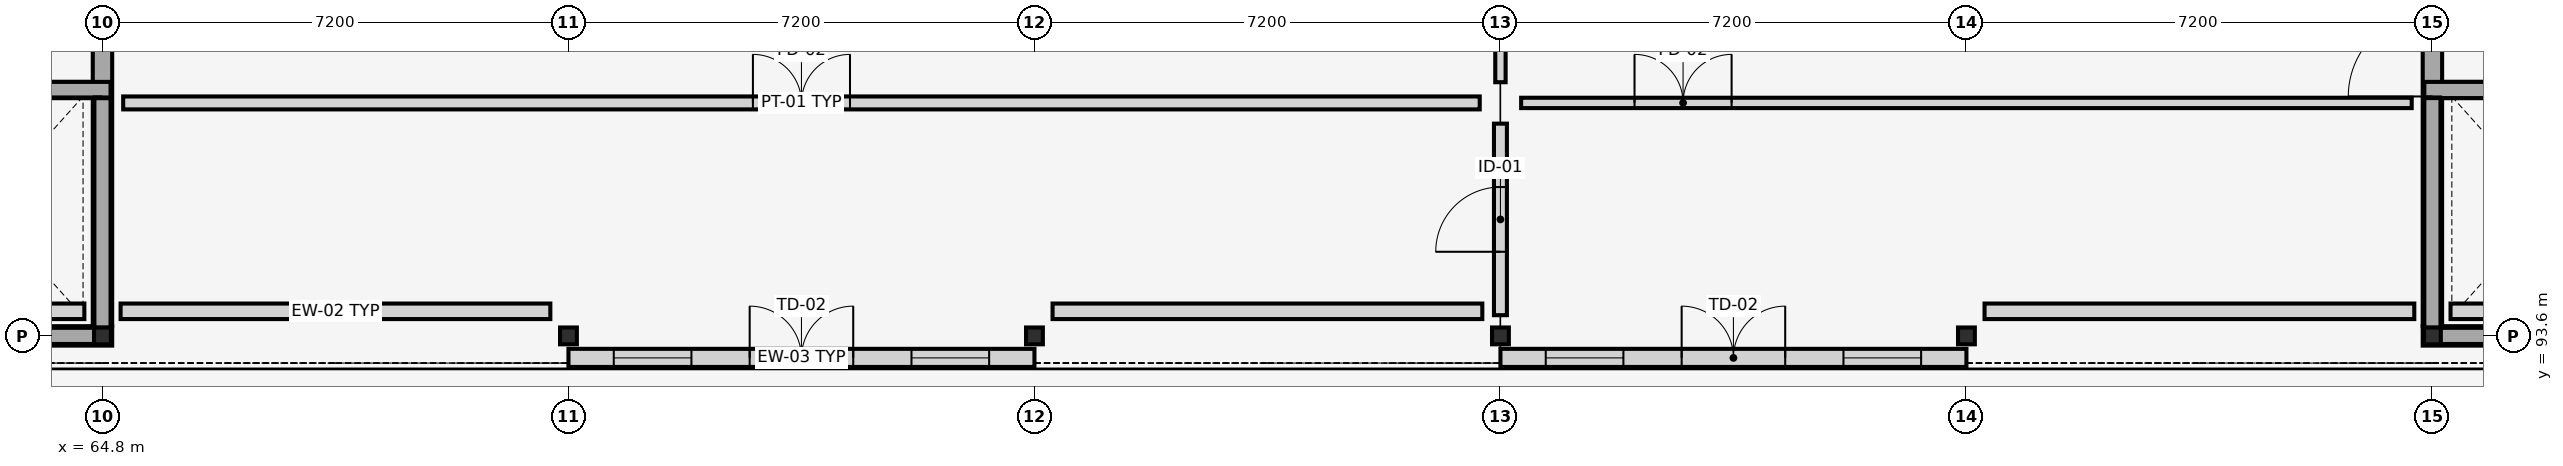
"""IFC4 building model, lengths in metres.
Left out: names, types, materials, properties, quantities, classifications, styles, units other than length and angle.
Written with IfcOpenShell. Run it as: python <this file> out.ifc"""

import sys

from ifc_helpers import new_model, si_unit, direction, frame, frame_2d, origin, origin_2d, place, context, subcontext, project, spatial, polyline, rectangle, i_section, outline, extrude, element, fill, save


model = new_model("IFC4")
c1 = context("Model", 3, precision=1e-05, world=origin(), true_north=direction((0.0, 1.0)))
c2 = subcontext(c1, "Body", "Model", "MODEL_VIEW")
j1 = project(units=[si_unit("LENGTHUNIT", "METRE"), si_unit("PLANEANGLEUNIT", "RADIAN")], contexts=[c1])
p1 = place(None, origin())
s1 = spatial("IfcSite", under=j1, at=p1, CompositionType="ELEMENT")
p2 = place(p1, origin())
s2 = spatial("IfcBuilding", under=s1, at=p2, CompositionType="ELEMENT")
p3 = place(p2, frame((0.0, 0.0, 25.2)))
s3 = spatial("IfcBuildingStorey", under=s2, at=p3, CompositionType="ELEMENT", Elevation=25.2)
for number, where, z_axis, x_axis in (
    (1, (64.8, 93.6, 0.0), (0.0, 0.0, 1.0), (0.0, 1.0, 0.0)),
    (2, (72.0, 93.6, 0.0), (0.0, 0.0, 1.0), (1.0, 0.0, 0.0)),
    (3, (79.2, 93.6, 0.0), (0.0, 0.0, 1.0), (0.0, 1.0, 0.0)),
    (4, (86.4, 93.6, 0.0), (0.0, 0.0, 1.0), (1.0, 0.0, 0.0)),
    (5, (93.6, 93.6, 0.0), (0.0, 0.0, 1.0), (0.0, 1.0, 0.0)),
    (6, (100.8, 93.6, 0.0), (0.0, 0.0, 1.0), (1.0, 0.0, 0.0)),
):
    element("IfcColumn", number, at=place(p3, frame(where, z_axis=z_axis, x_axis=x_axis)), inside=s3, PredefinedType="COLUMN", context=c2, shape_type="SweptSolid", body=[
        extrude(i_section(OverallWidth=0.26, OverallDepth=0.26, WebThickness=0.01, FlangeThickness=0.018, FilletRadius=0.024, at=origin_2d()), origin(), (0.0, 0.0, 1.0), 5.4),
    ])
p4 = place(p3, frame((57.88, 93.98, 0.0), z_axis=(0.0, 0.0, 1.0), x_axis=(1.0, 0.0, 0.0)))
e7 = element("IfcWall", 7, at=p4, inside=s3, PredefinedType="STANDARD", context=c2, shape_type="SweptSolid", body=[
    extrude(rectangle(XDim=6.64, YDim=0.24, at=frame_2d((3.32, 0.0))), origin(), (0.0, 0.0, 1.0), 4.78),
])
p5 = place(p3, frame((65.08, 93.98, 0.0), z_axis=(0.0, 0.0, 1.0), x_axis=(1.0, 0.0, 0.0)))
e8 = element("IfcWall", 8, at=p5, inside=s3, PredefinedType="STANDARD", context=c2, shape_type="SweptSolid", body=[
    extrude(rectangle(XDim=6.64, YDim=0.24, at=frame_2d((3.32, 0.0))), origin(), (0.0, 0.0, 1.0), 4.78),
])
p6 = place(p3, frame((72.0, 93.26, 0.0), z_axis=(0.0, 0.0, 1.0), x_axis=(1.0, 0.0, 0.0)))
e9 = element("IfcWall", 9, at=p6, inside=s3, PredefinedType="STANDARD", context=c2, shape_type="SweptSolid", body=[
    extrude(rectangle(XDim=7.2, YDim=0.28, at=frame_2d((3.6, 0.0))), origin(), (0.0, 0.0, 1.0), 5.4),
])
p7 = place(p6, frame((2.8, 0.0, 0.0)))
e10 = element("IfcOpeningElement", 10, at=p7, cuts=e9, PredefinedType="OPENING", context=c2, shape_type="SweptSolid", body=[
    extrude(rectangle(XDim=1.6, YDim=2.3, at=frame_2d((0.8, 1.15))), frame((0.0, 0.15, 0.0), z_axis=(0.0, -1.0, 0.0), x_axis=(1.0, 0.0, 0.0)), (0.0, 0.0, 1.0), 0.3),
])
p8 = place(p6, frame((0.7, 0.0, 0.85)))
e11 = element("IfcOpeningElement", 11, at=p8, cuts=e9, PredefinedType="OPENING", context=c2, shape_type="SweptSolid", body=[
    extrude(rectangle(XDim=1.2, YDim=2.2, at=frame_2d((0.6, 1.1))), frame((0.0, 0.15, 0.0), z_axis=(0.0, -1.0, 0.0), x_axis=(1.0, 0.0, 0.0)), (0.0, 0.0, 1.0), 0.3),
])
p9 = place(p6, frame((5.3, 0.0, 0.85)))
e12 = element("IfcOpeningElement", 12, at=p9, cuts=e9, PredefinedType="OPENING", context=c2, shape_type="SweptSolid", body=[
    extrude(rectangle(XDim=1.2, YDim=2.2, at=frame_2d((0.6, 1.1))), frame((0.0, 0.15, 0.0), z_axis=(0.0, -1.0, 0.0), x_axis=(1.0, 0.0, 0.0)), (0.0, 0.0, 1.0), 0.3),
])
p10 = place(p3, frame((79.48, 93.98, 0.0), z_axis=(0.0, 0.0, 1.0), x_axis=(1.0, 0.0, 0.0)))
e13 = element("IfcWall", 13, at=p10, inside=s3, PredefinedType="STANDARD", context=c2, shape_type="SweptSolid", body=[
    extrude(rectangle(XDim=6.64, YDim=0.24, at=frame_2d((3.32, 0.0))), origin(), (0.0, 0.0, 1.0), 4.78),
])
p11 = place(p3, frame((86.4, 93.26, 0.0), z_axis=(0.0, 0.0, 1.0), x_axis=(1.0, 0.0, 0.0)))
e14 = element("IfcWall", 14, at=p11, inside=s3, PredefinedType="STANDARD", context=c2, shape_type="SweptSolid", body=[
    extrude(rectangle(XDim=7.2, YDim=0.28, at=frame_2d((3.6, 0.0))), origin(), (0.0, 0.0, 1.0), 5.4),
])
p12 = place(p11, frame((2.8, 0.0, 0.0)))
e15 = element("IfcOpeningElement", 15, at=p12, cuts=e14, PredefinedType="OPENING", context=c2, shape_type="SweptSolid", body=[
    extrude(rectangle(XDim=1.6, YDim=2.3, at=frame_2d((0.8, 1.15))), frame((0.0, 0.15, 0.0), z_axis=(0.0, -1.0, 0.0), x_axis=(1.0, 0.0, 0.0)), (0.0, 0.0, 1.0), 0.3),
])
p13 = place(p11, frame((0.7, 0.0, 0.85)))
e16 = element("IfcOpeningElement", 16, at=p13, cuts=e14, PredefinedType="OPENING", context=c2, shape_type="SweptSolid", body=[
    extrude(rectangle(XDim=1.2, YDim=2.2, at=frame_2d((0.6, 1.1))), frame((0.0, 0.15, 0.0), z_axis=(0.0, -1.0, 0.0), x_axis=(1.0, 0.0, 0.0)), (0.0, 0.0, 1.0), 0.3),
])
p14 = place(p11, frame((5.3, 0.0, 0.85)))
e17 = element("IfcOpeningElement", 17, at=p14, cuts=e14, PredefinedType="OPENING", context=c2, shape_type="SweptSolid", body=[
    extrude(rectangle(XDim=1.2, YDim=2.2, at=frame_2d((0.6, 1.1))), frame((0.0, 0.15, 0.0), z_axis=(0.0, -1.0, 0.0), x_axis=(1.0, 0.0, 0.0)), (0.0, 0.0, 1.0), 0.3),
])
p15 = place(p3, frame((93.88, 93.98, 0.0), z_axis=(0.0, 0.0, 1.0), x_axis=(1.0, 0.0, 0.0)))
e18 = element("IfcWall", 18, at=p15, inside=s3, PredefinedType="STANDARD", context=c2, shape_type="SweptSolid", body=[
    extrude(rectangle(XDim=6.64, YDim=0.24, at=frame_2d((3.32, 0.0))), origin(), (0.0, 0.0, 1.0), 4.78),
])
p16 = place(p3, frame((101.08, 93.98, 0.0), z_axis=(0.0, 0.0, 1.0), x_axis=(1.0, 0.0, 0.0)))
e19 = element("IfcWall", 19, at=p16, inside=s3, PredefinedType="STANDARD", context=c2, shape_type="SweptSolid", body=[
    extrude(rectangle(XDim=6.64, YDim=0.24, at=frame_2d((3.32, 0.0))), origin(), (0.0, 0.0, 1.0), 4.78),
])
p17 = place(p3, frame((64.8, 97.55, 5.42), z_axis=(0.0, 0.0, 1.0), x_axis=(0.0, 1.0, 0.0)))
e20 = element("IfcWall", 20, at=p17, inside=s3, PredefinedType="STANDARD", context=c2, shape_type="SweptSolid", body=[
    extrude(outline(polyline([(0.0, 0.0), (3.25, 0.0), (3.25, 6.46), (0.0, 0.13), (0.0, 0.0)])), frame((0.0, 0.12, 0.0), z_axis=(0.0, -1.0, 0.0), x_axis=(1.0, 0.0, 0.0)), (0.0, 0.0, 1.0), 0.24),
])
p18 = place(p3, frame((57.6, 93.6, 0.0), z_axis=(0.0, 0.0, 1.0), x_axis=(1.0, 0.0, 0.0)))
e21 = element("IfcWall", 21, at=p18, inside=s3, PredefinedType="SHEAR", context=c2, shape_type="SweptSolid", body=[
    extrude(rectangle(XDim=7.35, YDim=0.3, at=frame_2d((3.675, 0.0))), origin(), (0.0, 0.0, 1.0), 5.18),
])
p19 = place(p3, frame((64.8, 93.75, 0.0), z_axis=(0.0, 0.0, 1.0), x_axis=(0.0, 1.0, 0.0)))
e22 = element("IfcWall", 22, at=p19, inside=s3, PredefinedType="SHEAR", context=c2, shape_type="SweptSolid", body=[
    extrude(rectangle(XDim=14.1, YDim=0.3, at=frame_2d((7.05, 0.0))), origin(), (0.0, 0.0, 1.0), 5.18),
])
p20 = place(p19, frame((3.55, 0.0, 0.0)))
e23 = element("IfcOpeningElement", 23, at=p20, cuts=e22, PredefinedType="OPENING", context=c2, shape_type="SweptSolid", body=[
    extrude(rectangle(XDim=1.3, YDim=2.2, at=frame_2d((0.65, 1.1))), frame((0.0, 0.16, 0.0), z_axis=(0.0, -1.0, 0.0), x_axis=(1.0, 0.0, 0.0)), (0.0, 0.0, 1.0), 0.32),
])
p21 = place(p19, frame((7.85, 0.0, 0.0)))
e24 = element("IfcOpeningElement", 24, at=p21, cuts=e22, PredefinedType="OPENING", context=c2, shape_type="SweptSolid", body=[
    extrude(rectangle(XDim=1.05, YDim=2.15, at=frame_2d((0.525, 1.075))), frame((0.0, 0.16, 0.0), z_axis=(0.0, -1.0, 0.0), x_axis=(1.0, 0.0, 0.0)), (0.0, 0.0, 1.0), 0.32),
])
p22 = place(p19, frame((10.55, 0.0, 0.0)))
e25 = element("IfcOpeningElement", 25, at=p22, cuts=e22, PredefinedType="OPENING", context=c2, shape_type="SweptSolid", body=[
    extrude(rectangle(XDim=1.0, YDim=2.15, at=frame_2d((0.5, 1.075))), frame((0.0, 0.16, 0.0), z_axis=(0.0, -1.0, 0.0), x_axis=(1.0, 0.0, 0.0)), (0.0, 0.0, 1.0), 0.32),
])
p23 = place(p3, frame((61.275, 97.4, 0.0), z_axis=(0.0, 0.0, 1.0), x_axis=(1.0, 0.0, 0.0)))
e26 = element("IfcWall", 26, at=p23, inside=s3, PredefinedType="SHEAR", context=c2, shape_type="SweptSolid", body=[
    extrude(rectangle(XDim=3.375, YDim=0.25, at=frame_2d((1.688, 0.0))), origin(), (0.0, 0.0, 1.0), 5.18),
])
p24 = place(p3, frame((61.275, 93.6, 5.18), z_axis=(0.0, 0.0, 1.0), x_axis=(1.0, 0.0, 0.0)))
e27 = element("IfcWall", 27, at=p24, inside=s3, PredefinedType="SHEAR", context=c2, shape_type="SweptSolid", body=[
    extrude(rectangle(XDim=3.65, YDim=0.25, at=frame_2d((1.825, 0.0))), origin(), (0.0, 0.0, 1.0), 1.72),
])
p25 = place(p3, frame((64.8, 93.725, 5.18), z_axis=(0.0, 0.0, 1.0), x_axis=(0.0, 1.0, 0.0)))
e28 = element("IfcWall", 28, at=p25, inside=s3, PredefinedType="SHEAR", context=c2, shape_type="SweptSolid", body=[
    extrude(rectangle(XDim=3.55, YDim=0.25, at=frame_2d((1.775, 0.0))), origin(), (0.0, 0.0, 1.0), 1.72),
])
p26 = place(p3, frame((64.925, 97.4, 5.18), z_axis=(0.0, 0.0, 1.0), x_axis=(-1.0, 0.0, 0.0)))
e29 = element("IfcWall", 29, at=p26, inside=s3, PredefinedType="SHEAR", context=c2, shape_type="SweptSolid", body=[
    extrude(rectangle(XDim=3.65, YDim=0.25, at=frame_2d((1.825, 0.0))), origin(), (0.0, 0.0, 1.0), 1.72),
])
p27 = place(p3, frame((100.65, 93.6, 0.0), z_axis=(0.0, 0.0, 1.0), x_axis=(1.0, 0.0, 0.0)))
e30 = element("IfcWall", 30, at=p27, inside=s3, PredefinedType="SHEAR", context=c2, shape_type="SweptSolid", body=[
    extrude(rectangle(XDim=7.35, YDim=0.3, at=frame_2d((3.675, 0.0))), origin(), (0.0, 0.0, 1.0), 5.18),
])
p28 = place(p3, frame((100.8, 93.75, 0.0), z_axis=(0.0, 0.0, 1.0), x_axis=(0.0, 1.0, 0.0)))
e31 = element("IfcWall", 31, at=p28, inside=s3, PredefinedType="SHEAR", context=c2, shape_type="SweptSolid", body=[
    extrude(rectangle(XDim=14.1, YDim=0.3, at=frame_2d((7.05, 0.0))), origin(), (0.0, 0.0, 1.0), 5.18),
])
p29 = place(p28, frame((3.55, 0.0, 0.0)))
e32 = element("IfcOpeningElement", 32, at=p29, cuts=e31, PredefinedType="OPENING", context=c2, shape_type="SweptSolid", body=[
    extrude(rectangle(XDim=1.3, YDim=2.2, at=frame_2d((0.65, 1.1))), frame((0.0, 0.16, 0.0), z_axis=(0.0, -1.0, 0.0), x_axis=(1.0, 0.0, 0.0)), (0.0, 0.0, 1.0), 0.32),
])
p30 = place(p28, frame((7.85, 0.0, 0.0)))
e33 = element("IfcOpeningElement", 33, at=p30, cuts=e31, PredefinedType="OPENING", context=c2, shape_type="SweptSolid", body=[
    extrude(rectangle(XDim=1.05, YDim=2.15, at=frame_2d((0.525, 1.075))), frame((0.0, 0.16, 0.0), z_axis=(0.0, -1.0, 0.0), x_axis=(1.0, 0.0, 0.0)), (0.0, 0.0, 1.0), 0.32),
])
p31 = place(p28, frame((10.55, 0.0, 0.0)))
e34 = element("IfcOpeningElement", 34, at=p31, cuts=e31, PredefinedType="OPENING", context=c2, shape_type="SweptSolid", body=[
    extrude(rectangle(XDim=1.0, YDim=2.15, at=frame_2d((0.5, 1.075))), frame((0.0, 0.16, 0.0), z_axis=(0.0, -1.0, 0.0), x_axis=(1.0, 0.0, 0.0)), (0.0, 0.0, 1.0), 0.32),
])
p32 = place(p3, frame((100.95, 97.4, 0.0), z_axis=(0.0, 0.0, 1.0), x_axis=(1.0, 0.0, 0.0)))
e35 = element("IfcWall", 35, at=p32, inside=s3, PredefinedType="SHEAR", context=c2, shape_type="SweptSolid", body=[
    extrude(rectangle(XDim=3.375, YDim=0.25, at=frame_2d((1.688, 0.0))), origin(), (0.0, 0.0, 1.0), 5.18),
])
for number, where, z_axis, x_axis in (
    (36, (100.675, 93.6, 5.18), (0.0, 0.0, 1.0), (1.0, 0.0, 0.0)),
    (37, (104.325, 97.4, 5.18), (0.0, 0.0, 1.0), (-1.0, 0.0, 0.0)),
):
    element("IfcWall", number, at=place(p3, frame(where, z_axis=z_axis, x_axis=x_axis)), inside=s3, PredefinedType="SHEAR", context=c2, shape_type="SweptSolid", body=[
        extrude(rectangle(XDim=3.65, YDim=0.25, at=frame_2d((1.825, 0.0))), origin(), (0.0, 0.0, 1.0), 1.72),
    ])
p33 = place(p3, frame((100.8, 97.275, 5.18), z_axis=(0.0, 0.0, 1.0), x_axis=(0.0, -1.0, 0.0)))
e38 = element("IfcWall", 38, at=p33, inside=s3, PredefinedType="SHEAR", context=c2, shape_type="SweptSolid", body=[
    extrude(rectangle(XDim=3.55, YDim=0.25, at=frame_2d((1.775, 0.0))), origin(), (0.0, 0.0, 1.0), 1.72),
])
p34 = place(p3, frame((65.12, 97.2, 0.0), z_axis=(0.0, 0.0, 1.0), x_axis=(1.0, 0.0, 0.0)))
e39 = element("IfcWall", 39, at=p34, inside=s3, PredefinedType="PARTITIONING", context=c2, shape_type="SweptSolid", body=[
    extrude(rectangle(XDim=20.96, YDim=0.2, at=frame_2d((10.48, 0.0))), origin(), (0.0, 0.0, 1.0), 4.35),
])
p35 = place(p34, frame((9.73, 0.0, 0.0)))
e40 = element("IfcOpeningElement", 40, at=p35, cuts=e39, PredefinedType="OPENING", context=c2, shape_type="SweptSolid", body=[
    extrude(rectangle(XDim=1.5, YDim=2.25, at=frame_2d((0.75, 1.125))), frame((0.0, 0.11, 0.0), z_axis=(0.0, -1.0, 0.0), x_axis=(1.0, 0.0, 0.0)), (0.0, 0.0, 1.0), 0.22),
])
p36 = place(p3, frame((86.4, 93.92, 0.0), z_axis=(0.0, 0.0, 1.0), x_axis=(0.0, 1.0, 0.0)))
e41 = element("IfcWall", 41, at=p36, inside=s3, PredefinedType="PARTITIONING", context=c2, shape_type="SweptSolid", body=[
    extrude(rectangle(XDim=2.96, YDim=0.2, at=frame_2d((1.48, 0.0))), origin(), (0.0, 0.0, 1.0), 4.35),
])
p37 = place(p36, frame((0.98, 0.0, 0.0)))
e42 = element("IfcOpeningElement", 42, at=p37, cuts=e41, PredefinedType="OPENING", context=c2, shape_type="SweptSolid", body=[
    extrude(rectangle(XDim=1.0, YDim=2.15, at=frame_2d((0.5, 1.075))), frame((0.0, 0.11, 0.0), z_axis=(0.0, -1.0, 0.0), x_axis=(1.0, 0.0, 0.0)), (0.0, 0.0, 1.0), 0.22),
])
p38 = place(p3, frame((86.4, 97.52, 0.0), z_axis=(0.0, 0.0, 1.0), x_axis=(0.0, 1.0, 0.0)))
e43 = element("IfcWall", 43, at=p38, inside=s3, PredefinedType="PARTITIONING", context=c2, shape_type="SweptSolid", body=[
    extrude(rectangle(XDim=17.36, YDim=0.16, at=frame_2d((8.68, 0.0))), origin(), (0.0, 0.0, 1.0), 4.35),
])
p39 = place(p38, frame((7.705, 0.0, 0.0)))
e44 = element("IfcOpeningElement", 44, at=p39, cuts=e43, PredefinedType="OPENING", context=c2, shape_type="SweptSolid", body=[
    extrude(rectangle(XDim=1.95, YDim=2.6, at=frame_2d((0.975, 1.3))), frame((0.0, 0.09, 0.0), z_axis=(0.0, -1.0, 0.0), x_axis=(1.0, 0.0, 0.0)), (0.0, 0.0, 1.0), 0.18),
])
p40 = place(p3, frame((86.72, 97.2, 0.0), z_axis=(0.0, 0.0, 1.0), x_axis=(1.0, 0.0, 0.0)))
e45 = element("IfcWall", 45, at=p40, inside=s3, PredefinedType="PARTITIONING", context=c2, shape_type="SweptSolid", body=[
    extrude(rectangle(XDim=13.76, YDim=0.16, at=frame_2d((6.88, 0.0))), origin(), (0.0, 0.0, 1.0), 4.35),
])
p41 = place(p40, frame((1.752, 0.0, 0.0)))
e46 = element("IfcOpeningElement", 46, at=p41, cuts=e45, PredefinedType="OPENING", context=c2, shape_type="SweptSolid", body=[
    extrude(rectangle(XDim=1.5, YDim=2.25, at=frame_2d((0.75, 1.125))), frame((0.0, 0.09, 0.0), z_axis=(0.0, -1.0, 0.0), x_axis=(1.0, 0.0, 0.0)), (0.0, 0.0, 1.0), 0.18),
])
p42 = place(p7, origin())
e47 = element("IfcDoor", 47, at=p42, inside=s3, OperationType="DOUBLE_DOOR_SINGLE_SWING", PredefinedType="DOOR", context=c2, shape_type="SweptSolid", body=[
    extrude(rectangle(XDim=1.6, YDim=2.3, at=frame_2d((0.8, 1.15))), frame((0.0, 0.025, 0.0), z_axis=(0.0, -1.0, 0.0), x_axis=(1.0, 0.0, 0.0)), (0.0, 0.0, 1.0), 0.05),
])
fill(e10, e47)
p43 = place(p8, origin())
e48 = element("IfcWindow", 48, at=p43, inside=s3, PartitioningType="SINGLE_PANEL", PredefinedType="WINDOW", context=c2, shape_type="SweptSolid", body=[
    extrude(rectangle(XDim=1.2, YDim=2.2, at=frame_2d((0.6, 1.1))), frame((0.0, 0.03, 0.0), z_axis=(0.0, -1.0, 0.0), x_axis=(1.0, 0.0, 0.0)), (0.0, 0.0, 1.0), 0.06),
])
fill(e11, e48)
p44 = place(p9, origin())
e49 = element("IfcWindow", 49, at=p44, inside=s3, PartitioningType="SINGLE_PANEL", PredefinedType="WINDOW", context=c2, shape_type="SweptSolid", body=[
    extrude(rectangle(XDim=1.2, YDim=2.2, at=frame_2d((0.6, 1.1))), frame((0.0, 0.03, 0.0), z_axis=(0.0, -1.0, 0.0), x_axis=(1.0, 0.0, 0.0)), (0.0, 0.0, 1.0), 0.06),
])
fill(e12, e49)
p45 = place(p12, origin())
e50 = element("IfcDoor", 50, at=p45, inside=s3, OperationType="DOUBLE_DOOR_SINGLE_SWING", PredefinedType="DOOR", context=c2, shape_type="SweptSolid", body=[
    extrude(rectangle(XDim=1.6, YDim=2.3, at=frame_2d((0.8, 1.15))), frame((0.0, 0.025, 0.0), z_axis=(0.0, -1.0, 0.0), x_axis=(1.0, 0.0, 0.0)), (0.0, 0.0, 1.0), 0.05),
])
fill(e15, e50)
p46 = place(p13, origin())
e51 = element("IfcWindow", 51, at=p46, inside=s3, PartitioningType="SINGLE_PANEL", PredefinedType="WINDOW", context=c2, shape_type="SweptSolid", body=[
    extrude(rectangle(XDim=1.2, YDim=2.2, at=frame_2d((0.6, 1.1))), frame((0.0, 0.03, 0.0), z_axis=(0.0, -1.0, 0.0), x_axis=(1.0, 0.0, 0.0)), (0.0, 0.0, 1.0), 0.06),
])
fill(e16, e51)
p47 = place(p14, origin())
e52 = element("IfcWindow", 52, at=p47, inside=s3, PartitioningType="SINGLE_PANEL", PredefinedType="WINDOW", context=c2, shape_type="SweptSolid", body=[
    extrude(rectangle(XDim=1.2, YDim=2.2, at=frame_2d((0.6, 1.1))), frame((0.0, 0.03, 0.0), z_axis=(0.0, -1.0, 0.0), x_axis=(1.0, 0.0, 0.0)), (0.0, 0.0, 1.0), 0.06),
])
fill(e17, e52)
p48 = place(p20, origin())
e53 = element("IfcDoor", 53, at=p48, inside=s3, OperationType="SINGLE_SWING_LEFT", PredefinedType="DOOR", context=c2, shape_type="SweptSolid", body=[
    extrude(rectangle(XDim=1.3, YDim=2.2, at=frame_2d((0.65, 1.1))), frame((0.0, 0.025, 0.0), z_axis=(0.0, -1.0, 0.0), x_axis=(1.0, 0.0, 0.0)), (0.0, 0.0, 1.0), 0.05),
])
fill(e23, e53)
p49 = place(p29, origin())
e54 = element("IfcDoor", 54, at=p49, inside=s3, OperationType="SINGLE_SWING_LEFT", PredefinedType="DOOR", context=c2, shape_type="SweptSolid", body=[
    extrude(rectangle(XDim=1.3, YDim=2.2, at=frame_2d((0.65, 1.1))), frame((0.0, 0.025, 0.0), z_axis=(0.0, -1.0, 0.0), x_axis=(1.0, 0.0, 0.0)), (0.0, 0.0, 1.0), 0.05),
])
fill(e32, e54)
p50 = place(p35, origin())
e55 = element("IfcDoor", 55, at=p50, inside=s3, OperationType="DOUBLE_DOOR_SINGLE_SWING", PredefinedType="DOOR", context=c2, shape_type="SweptSolid", body=[
    extrude(rectangle(XDim=1.5, YDim=2.25, at=frame_2d((0.75, 1.125))), frame((0.0, 0.025, 0.0), z_axis=(0.0, -1.0, 0.0), x_axis=(1.0, 0.0, 0.0)), (0.0, 0.0, 1.0), 0.05),
])
fill(e40, e55)
p51 = place(p37, origin())
e56 = element("IfcDoor", 56, at=p51, inside=s3, OperationType="SINGLE_SWING_LEFT", PredefinedType="DOOR", context=c2, shape_type="SweptSolid", body=[
    extrude(rectangle(XDim=1.0, YDim=2.15, at=frame_2d((0.5, 1.075))), frame((0.0, 0.025, 0.0), z_axis=(0.0, -1.0, 0.0), x_axis=(1.0, 0.0, 0.0)), (0.0, 0.0, 1.0), 0.05),
])
fill(e42, e56)
p52 = place(p41, origin())
e57 = element("IfcDoor", 57, at=p52, inside=s3, OperationType="DOUBLE_DOOR_SINGLE_SWING", PredefinedType="DOOR", context=c2, shape_type="SweptSolid", body=[
    extrude(rectangle(XDim=1.5, YDim=2.25, at=frame_2d((0.75, 1.125))), frame((0.0, 0.025, 0.0), z_axis=(0.0, -1.0, 0.0), x_axis=(1.0, 0.0, 0.0)), (0.0, 0.0, 1.0), 0.05),
])
fill(e46, e57)
save(model, sys.argv[1])
